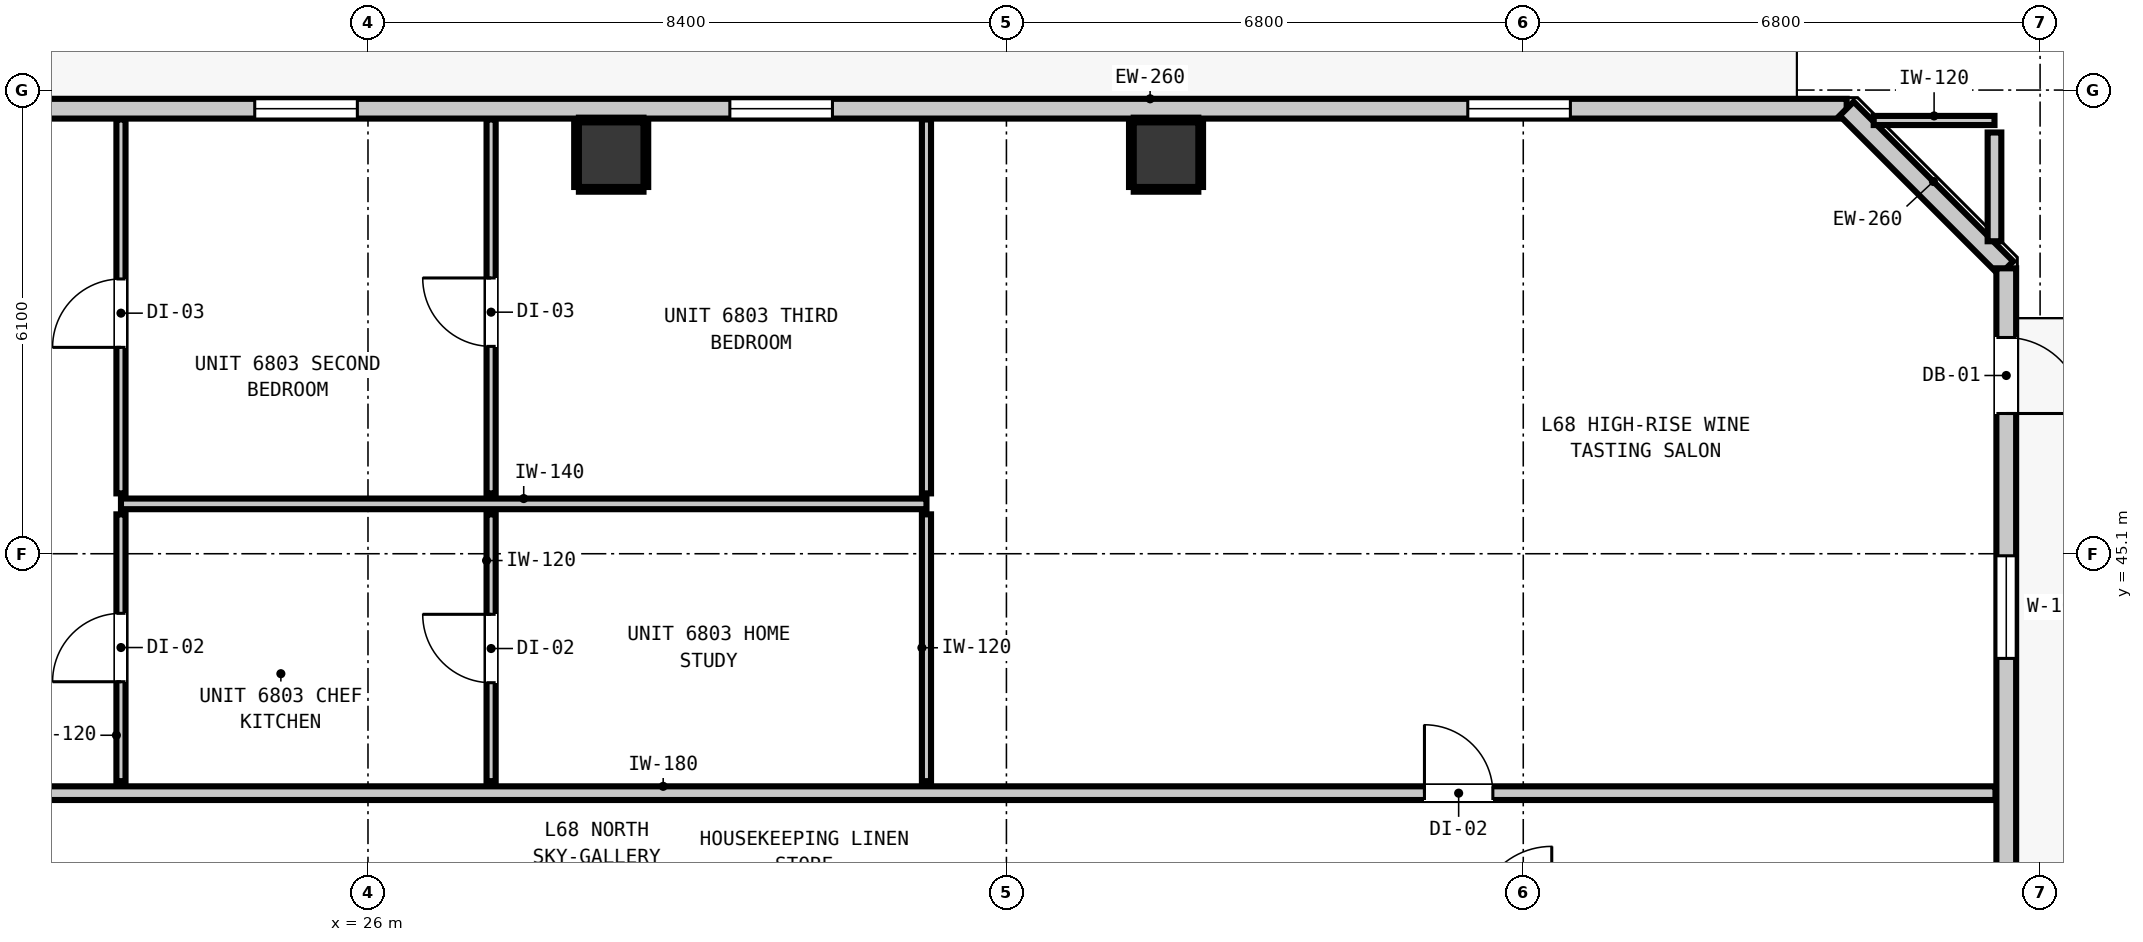
"""IFC4 building model, lengths in metres.
Left out: names, types, materials, properties, quantities, classifications, styles, units other than length and angle.
Written with IfcOpenShell. Run it as: python <this file> out.ifc"""

import sys

from ifc_helpers import new_model, si_unit, direction, frame, frame_2d, origin, origin_2d, place, context, subcontext, project, spatial, rectangle, extrude, element, fill, save


model = new_model("IFC4")
c1 = context("Model", 3, precision=1e-05, world=origin(), true_north=direction((0.0, 1.0)))
c2 = subcontext(c1, "Body", "Model", "MODEL_VIEW")
j1 = project(units=[si_unit("LENGTHUNIT", "METRE"), si_unit("PLANEANGLEUNIT", "RADIAN")], contexts=[c1])
p1 = place(None, origin())
s1 = spatial("IfcSite", under=j1, at=p1, CompositionType="ELEMENT")
p2 = place(p1, origin())
s2 = spatial("IfcBuilding", under=s1, at=p2, CompositionType="ELEMENT")
p3 = place(p2, frame((0.0, 0.0, 234.6)))
s3 = spatial("IfcBuildingStorey", under=s2, at=p3, CompositionType="ELEMENT", Elevation=234.6)
for number, where, z_axis, x_axis in (
    (1, (29.2, 50.35, 0.0), (0.0, 0.0, 1.0), (1.0, 0.0, 0.0)),
    (2, (36.5, 50.35, 0.0), (0.0, 0.0, 1.0), (1.0, 0.0, 0.0)),
):
    element("IfcColumn", number, at=place(p3, frame(where, z_axis=z_axis, x_axis=x_axis)), inside=s3, PredefinedType="COLUMN", context=c2, shape_type="SweptSolid", body=[
        extrude(rectangle(XDim=0.85, YDim=0.85, at=origin_2d()), origin(), (0.0, 0.0, 1.0), 3.32),
    ])
p4 = place(p3, frame((12.745, 50.955, 0.0), z_axis=(0.0, 0.0, 1.0), x_axis=(1.0, 0.0, 0.0)))
e3 = element("IfcWall", 3, at=p4, inside=s3, PredefinedType="STANDARD", context=c2, shape_type="SweptSolid", body=[
    extrude(rectangle(XDim=32.71, YDim=0.26, at=frame_2d((16.355, 0.0))), origin(), (0.0, 0.0, 1.0), 3.1),
])
p5 = place(p4, frame((1.61, 0.0, 0.0)))
e4 = element("IfcOpeningElement", 4, at=p5, cuts=e3, PredefinedType="OPENING", context=c2, shape_type="SweptSolid", body=[
    extrude(rectangle(XDim=1.0, YDim=2.15, at=frame_2d((0.5, 1.075))), frame((0.0, 0.14, 0.0), z_axis=(0.0, -1.0, 0.0), x_axis=(1.0, 0.0, 0.0)), (0.0, 0.0, 1.0), 0.28),
])
p6 = place(p4, frame((4.811, 0.0, 0.85)))
e5 = element("IfcOpeningElement", 5, at=p6, cuts=e3, PredefinedType="OPENING", context=c2, shape_type="SweptSolid", body=[
    extrude(rectangle(XDim=1.35, YDim=1.85, at=frame_2d((0.675, 0.925))), frame((0.0, 0.14, 0.0), z_axis=(0.0, -1.0, 0.0), x_axis=(1.0, 0.0, 0.0)), (0.0, 0.0, 1.0), 0.28),
])
p7 = place(p4, frame((11.765, 0.0, 0.85)))
e6 = element("IfcOpeningElement", 6, at=p7, cuts=e3, PredefinedType="OPENING", context=c2, shape_type="SweptSolid", body=[
    extrude(rectangle(XDim=1.35, YDim=1.85, at=frame_2d((0.675, 0.925))), frame((0.0, 0.14, 0.0), z_axis=(0.0, -1.0, 0.0), x_axis=(1.0, 0.0, 0.0)), (0.0, 0.0, 1.0), 0.28),
])
p8 = place(p4, frame((18.016, 0.0, 0.85)))
e7 = element("IfcOpeningElement", 7, at=p8, cuts=e3, PredefinedType="OPENING", context=c2, shape_type="SweptSolid", body=[
    extrude(rectangle(XDim=1.35, YDim=1.85, at=frame_2d((0.675, 0.925))), frame((0.0, 0.14, 0.0), z_axis=(0.0, -1.0, 0.0), x_axis=(1.0, 0.0, 0.0)), (0.0, 0.0, 1.0), 0.28),
])
p9 = place(p4, frame((27.725, 0.0, 0.85)))
e8 = element("IfcOpeningElement", 8, at=p9, cuts=e3, PredefinedType="OPENING", context=c2, shape_type="SweptSolid", body=[
    extrude(rectangle(XDim=1.35, YDim=1.85, at=frame_2d((0.675, 0.925))), frame((0.0, 0.14, 0.0), z_axis=(0.0, -1.0, 0.0), x_axis=(1.0, 0.0, 0.0)), (0.0, 0.0, 1.0), 0.28),
])
p10 = place(p3, frame((45.455, 50.955, 0.0), z_axis=(0.0, 0.0, 1.0), x_axis=(0.707065676302, -0.707147883682, 0.0)))
e9 = element("IfcWall", 9, at=p10, inside=s3, PredefinedType="STANDARD", context=c2, shape_type="SweptSolid", body=[
    extrude(rectangle(XDim=2.97, YDim=0.26, at=frame_2d((1.485, 0.0))), origin(), (0.0, 0.0, 1.0), 3.1),
])
p11 = place(p3, frame((47.555, 48.855, 0.0), z_axis=(0.0, 0.0, 1.0), x_axis=(0.0, -1.0, 0.0)))
e10 = element("IfcWall", 10, at=p11, inside=s3, PredefinedType="STANDARD", context=c2, shape_type="SweptSolid", body=[
    extrude(rectangle(XDim=30.31, YDim=0.26, at=frame_2d((15.155, 0.0))), origin(), (0.0, 0.0, 1.0), 3.1),
])
p12 = place(p11, frame((0.91, 0.0, 0.0)))
e11 = element("IfcOpeningElement", 11, at=p12, cuts=e10, PredefinedType="OPENING", context=c2, shape_type="SweptSolid", body=[
    extrude(rectangle(XDim=1.0, YDim=2.15, at=frame_2d((0.5, 1.075))), frame((0.0, 0.14, 0.0), z_axis=(0.0, -1.0, 0.0), x_axis=(1.0, 0.0, 0.0)), (0.0, 0.0, 1.0), 0.28),
])
p13 = place(p11, frame((3.782, 0.0, 0.85)))
e12 = element("IfcOpeningElement", 12, at=p13, cuts=e10, PredefinedType="OPENING", context=c2, shape_type="SweptSolid", body=[
    extrude(rectangle(XDim=1.35, YDim=1.85, at=frame_2d((0.675, 0.925))), frame((0.0, 0.14, 0.0), z_axis=(0.0, -1.0, 0.0), x_axis=(1.0, 0.0, 0.0)), (0.0, 0.0, 1.0), 0.28),
])
p14 = place(p3, frame((10.787, 41.95, 0.0), z_axis=(0.0, 0.0, 1.0), x_axis=(1.0, 0.0, 0.0)))
e13 = element("IfcWall", 13, at=p14, inside=s3, PredefinedType="PARTITIONING", context=c2, shape_type="SweptSolid", body=[
    extrude(rectangle(XDim=36.626, YDim=0.18, at=frame_2d((18.313, 0.0))), origin(), (0.0, 0.0, 1.0), 3.1),
])
p15 = place(p14, frame((8.081, 0.0, 0.0)))
e14 = element("IfcOpeningElement", 14, at=p15, cuts=e13, PredefinedType="OPENING", context=c2, shape_type="SweptSolid", body=[
    extrude(rectangle(XDim=1.0, YDim=2.15, at=frame_2d((0.5, 1.075))), frame((0.0, 0.1, 0.0), z_axis=(0.0, -1.0, 0.0), x_axis=(1.0, 0.0, 0.0)), (0.0, 0.0, 1.0), 0.2),
])
p16 = place(p14, frame((29.113, 0.0, 0.0)))
e15 = element("IfcOpeningElement", 15, at=p16, cuts=e13, PredefinedType="OPENING", context=c2, shape_type="SweptSolid", body=[
    extrude(rectangle(XDim=0.9, YDim=2.1, at=frame_2d((0.45, 1.05))), frame((0.0, 0.1, 0.0), z_axis=(0.0, -1.0, 0.0), x_axis=(1.0, 0.0, 0.0)), (0.0, 0.0, 1.0), 0.2),
])
p17 = place(p3, frame((22.75, 45.756, 0.0), z_axis=(0.0, 0.0, 1.0), x_axis=(1.0, 0.0, 0.0)))
e16 = element("IfcWall", 16, at=p17, inside=s3, PredefinedType="PARTITIONING", context=c2, shape_type="SweptSolid", body=[
    extrude(rectangle(XDim=10.598, YDim=0.14, at=frame_2d((5.299, 0.0))), origin(), (0.0, 0.0, 1.0), 3.1),
])
p18 = place(p3, frame((45.811, 50.8, 0.0), z_axis=(0.0, 0.0, 1.0), x_axis=(1.0, 0.0, 0.0)))
e17 = element("IfcWall", 17, at=p18, inside=s3, PredefinedType="PARTITIONING", context=c2, shape_type="SweptSolid", body=[
    extrude(rectangle(XDim=1.589, YDim=0.12, at=frame_2d((0.794, 0.0))), origin(), (0.0, 0.0, 1.0), 3.1),
])
p19 = place(p3, frame((47.4, 49.211, 0.0), z_axis=(0.0, 0.0, 1.0), x_axis=(0.0, 1.0, 0.0)))
e18 = element("IfcWall", 18, at=p19, inside=s3, PredefinedType="PARTITIONING", context=c2, shape_type="SweptSolid", body=[
    extrude(rectangle(XDim=1.431, YDim=0.18, at=frame_2d((0.716, 0.0))), origin(), (0.0, 0.0, 1.0), 3.1),
])
p20 = place(p3, frame((22.75, 42.108, 0.0), z_axis=(0.0, 0.0, 1.0), x_axis=(0.0, 1.0, 0.0)))
e19 = element("IfcWall", 19, at=p20, inside=s3, PredefinedType="PARTITIONING", context=c2, shape_type="SweptSolid", body=[
    extrude(rectangle(XDim=3.51, YDim=0.12, at=frame_2d((1.755, 0.0))), origin(), (0.0, 0.0, 1.0), 3.1),
])
p21 = place(p20, frame((1.308, 0.0, 0.0)))
e20 = element("IfcOpeningElement", 20, at=p21, cuts=e19, PredefinedType="OPENING", context=c2, shape_type="SweptSolid", body=[
    extrude(rectangle(XDim=0.9, YDim=2.1, at=frame_2d((0.45, 1.05))), frame((0.0, 0.07, 0.0), z_axis=(0.0, -1.0, 0.0), x_axis=(1.0, 0.0, 0.0)), (0.0, 0.0, 1.0), 0.14),
])
p22 = place(p3, frame((22.75, 45.894, 0.0), z_axis=(0.0, 0.0, 1.0), x_axis=(0.0, 1.0, 0.0)))
e21 = element("IfcWall", 21, at=p22, inside=s3, PredefinedType="PARTITIONING", context=c2, shape_type="SweptSolid", body=[
    extrude(rectangle(XDim=4.919, YDim=0.12, at=frame_2d((2.459, 0.0))), origin(), (0.0, 0.0, 1.0), 3.1),
])
p23 = place(p22, frame((1.921, 0.0, 0.0)))
e22 = element("IfcOpeningElement", 22, at=p23, cuts=e21, PredefinedType="OPENING", context=c2, shape_type="SweptSolid", body=[
    extrude(rectangle(XDim=0.9, YDim=2.1, at=frame_2d((0.45, 1.05))), frame((0.0, 0.07, 0.0), z_axis=(0.0, -1.0, 0.0), x_axis=(1.0, 0.0, 0.0)), (0.0, 0.0, 1.0), 0.14),
])
p24 = place(p3, frame((27.62, 42.108, 0.0), z_axis=(0.0, 0.0, 1.0), x_axis=(0.0, 1.0, 0.0)))
e23 = element("IfcWall", 23, at=p24, inside=s3, PredefinedType="PARTITIONING", context=c2, shape_type="SweptSolid", body=[
    extrude(rectangle(XDim=3.51, YDim=0.12, at=frame_2d((1.755, 0.0))), origin(), (0.0, 0.0, 1.0), 3.1),
])
p25 = place(p24, frame((1.295, 0.0, 0.0)))
e24 = element("IfcOpeningElement", 24, at=p25, cuts=e23, PredefinedType="OPENING", context=c2, shape_type="SweptSolid", body=[
    extrude(rectangle(XDim=0.9, YDim=2.1, at=frame_2d((0.45, 1.05))), frame((0.0, 0.07, 0.0), z_axis=(0.0, -1.0, 0.0), x_axis=(1.0, 0.0, 0.0)), (0.0, 0.0, 1.0), 0.14),
])
p26 = place(p3, frame((27.62, 45.894, 0.0), z_axis=(0.0, 0.0, 1.0), x_axis=(0.0, 1.0, 0.0)))
e25 = element("IfcWall", 25, at=p26, inside=s3, PredefinedType="PARTITIONING", context=c2, shape_type="SweptSolid", body=[
    extrude(rectangle(XDim=4.919, YDim=0.12, at=frame_2d((2.459, 0.0))), origin(), (0.0, 0.0, 1.0), 3.1),
])
p27 = place(p26, frame((1.934, 0.0, 0.0)))
e26 = element("IfcOpeningElement", 26, at=p27, cuts=e25, PredefinedType="OPENING", context=c2, shape_type="SweptSolid", body=[
    extrude(rectangle(XDim=0.9, YDim=2.1, at=frame_2d((0.45, 1.05))), frame((0.0, 0.07, 0.0), z_axis=(0.0, -1.0, 0.0), x_axis=(1.0, 0.0, 0.0)), (0.0, 0.0, 1.0), 0.14),
])
p28 = place(p3, frame((33.348, 42.108, 0.0), z_axis=(0.0, 0.0, 1.0), x_axis=(0.0, 1.0, 0.0)))
e27 = element("IfcWall", 27, at=p28, inside=s3, PredefinedType="PARTITIONING", context=c2, shape_type="SweptSolid", body=[
    extrude(rectangle(XDim=3.51, YDim=0.12, at=frame_2d((1.755, 0.0))), origin(), (0.0, 0.0, 1.0), 3.1),
])
p29 = place(p3, frame((33.348, 45.894, 0.0), z_axis=(0.0, 0.0, 1.0), x_axis=(0.0, 1.0, 0.0)))
e28 = element("IfcWall", 28, at=p29, inside=s3, PredefinedType="PARTITIONING", context=c2, shape_type="SweptSolid", body=[
    extrude(rectangle(XDim=4.919, YDim=0.12, at=frame_2d((2.459, 0.0))), origin(), (0.0, 0.0, 1.0), 3.1),
])
for number, where, z_axis, x_axis in (
    (29, (28.775, 49.893, 0.0), (0.0, 0.0, 1.0), (1.0, 0.0, 0.0)),
    (30, (28.775, 50.807, 0.0), (0.0, 0.0, 1.0), (1.0, 0.0, 0.0)),
):
    element("IfcWall", number, at=place(p3, frame(where, z_axis=z_axis, x_axis=x_axis)), inside=s3, PredefinedType="PARTITIONING", context=c2, shape_type="SweptSolid", body=[
        extrude(rectangle(XDim=0.85, YDim=0.06, at=frame_2d((0.425, 0.0))), origin(), (0.0, 0.0, 1.0), 1.45),
    ])
for number, where, z_axis, x_axis in (
    (31, (28.743, 49.925, 0.0), (0.0, 0.0, 1.0), (0.0, 1.0, 0.0)),
    (32, (29.657, 49.925, 0.0), (0.0, 0.0, 1.0), (0.0, 1.0, 0.0)),
):
    element("IfcWall", number, at=place(p3, frame(where, z_axis=z_axis, x_axis=x_axis)), inside=s3, PredefinedType="PARTITIONING", context=c2, shape_type="SweptSolid", body=[
        extrude(rectangle(XDim=0.85, YDim=0.06, at=frame_2d((0.425, 0.0))), origin(), (0.0, 0.0, 1.0), 1.45),
    ])
for number, where, z_axis, x_axis in (
    (33, (36.075, 49.893, 0.0), (0.0, 0.0, 1.0), (1.0, 0.0, 0.0)),
    (34, (36.075, 50.807, 0.0), (0.0, 0.0, 1.0), (1.0, 0.0, 0.0)),
):
    element("IfcWall", number, at=place(p3, frame(where, z_axis=z_axis, x_axis=x_axis)), inside=s3, PredefinedType="PARTITIONING", context=c2, shape_type="SweptSolid", body=[
        extrude(rectangle(XDim=0.85, YDim=0.06, at=frame_2d((0.425, 0.0))), origin(), (0.0, 0.0, 1.0), 1.45),
    ])
for number, where, z_axis, x_axis in (
    (35, (36.043, 49.925, 0.0), (0.0, 0.0, 1.0), (0.0, 1.0, 0.0)),
    (36, (36.957, 49.925, 0.0), (0.0, 0.0, 1.0), (0.0, 1.0, 0.0)),
):
    element("IfcWall", number, at=place(p3, frame(where, z_axis=z_axis, x_axis=x_axis)), inside=s3, PredefinedType="PARTITIONING", context=c2, shape_type="SweptSolid", body=[
        extrude(rectangle(XDim=0.85, YDim=0.06, at=frame_2d((0.425, 0.0))), origin(), (0.0, 0.0, 1.0), 1.45),
    ])
p30 = place(p12, origin())
e37 = element("IfcDoor", 37, at=p30, inside=s3, OperationType="SINGLE_SWING_RIGHT", PredefinedType="DOOR", context=c2, shape_type="SweptSolid", body=[
    extrude(rectangle(XDim=1.0, YDim=2.15, at=frame_2d((0.5, 1.075))), frame((0.0, 0.025, 0.0), z_axis=(0.0, -1.0, 0.0), x_axis=(1.0, 0.0, 0.0)), (0.0, 0.0, 1.0), 0.05),
])
fill(e11, e37)
p31 = place(p7, origin())
e38 = element("IfcWindow", 38, at=p31, inside=s3, PartitioningType="SINGLE_PANEL", PredefinedType="WINDOW", context=c2, shape_type="SweptSolid", body=[
    extrude(rectangle(XDim=1.35, YDim=1.85, at=frame_2d((0.675, 0.925))), frame((0.0, 0.03, 0.0), z_axis=(0.0, -1.0, 0.0), x_axis=(1.0, 0.0, 0.0)), (0.0, 0.0, 1.0), 0.06),
])
fill(e6, e38)
p32 = place(p8, origin())
e39 = element("IfcWindow", 39, at=p32, inside=s3, PartitioningType="SINGLE_PANEL", PredefinedType="WINDOW", context=c2, shape_type="SweptSolid", body=[
    extrude(rectangle(XDim=1.35, YDim=1.85, at=frame_2d((0.675, 0.925))), frame((0.0, 0.03, 0.0), z_axis=(0.0, -1.0, 0.0), x_axis=(1.0, 0.0, 0.0)), (0.0, 0.0, 1.0), 0.06),
])
fill(e7, e39)
p33 = place(p9, origin())
e40 = element("IfcWindow", 40, at=p33, inside=s3, PartitioningType="SINGLE_PANEL", PredefinedType="WINDOW", context=c2, shape_type="SweptSolid", body=[
    extrude(rectangle(XDim=1.35, YDim=1.85, at=frame_2d((0.675, 0.925))), frame((0.0, 0.03, 0.0), z_axis=(0.0, -1.0, 0.0), x_axis=(1.0, 0.0, 0.0)), (0.0, 0.0, 1.0), 0.06),
])
fill(e8, e40)
p34 = place(p13, origin())
e41 = element("IfcWindow", 41, at=p34, inside=s3, PartitioningType="SINGLE_PANEL", PredefinedType="WINDOW", context=c2, shape_type="SweptSolid", body=[
    extrude(rectangle(XDim=1.35, YDim=1.85, at=frame_2d((0.675, 0.925))), frame((0.0, 0.03, 0.0), z_axis=(0.0, -1.0, 0.0), x_axis=(1.0, 0.0, 0.0)), (0.0, 0.0, 1.0), 0.06),
])
fill(e12, e41)
p35 = place(p21, origin())
e42 = element("IfcDoor", 42, at=p35, inside=s3, OperationType="SINGLE_SWING_LEFT", PredefinedType="DOOR", context=c2, shape_type="SweptSolid", body=[
    extrude(rectangle(XDim=0.9, YDim=2.1, at=frame_2d((0.45, 1.05))), frame((0.0, 0.025, 0.0), z_axis=(0.0, -1.0, 0.0), x_axis=(1.0, 0.0, 0.0)), (0.0, 0.0, 1.0), 0.05),
])
fill(e20, e42)
p36 = place(p25, origin())
e43 = element("IfcDoor", 43, at=p36, inside=s3, OperationType="SINGLE_SWING_RIGHT", PredefinedType="DOOR", context=c2, shape_type="SweptSolid", body=[
    extrude(rectangle(XDim=0.9, YDim=2.1, at=frame_2d((0.45, 1.05))), frame((0.0, 0.025, 0.0), z_axis=(0.0, -1.0, 0.0), x_axis=(1.0, 0.0, 0.0)), (0.0, 0.0, 1.0), 0.05),
])
fill(e24, e43)
p37 = place(p23, origin())
e44 = element("IfcDoor", 44, at=p37, inside=s3, OperationType="SINGLE_SWING_LEFT", PredefinedType="DOOR", context=c2, shape_type="SweptSolid", body=[
    extrude(rectangle(XDim=0.9, YDim=2.1, at=frame_2d((0.45, 1.05))), frame((0.0, 0.025, 0.0), z_axis=(0.0, -1.0, 0.0), x_axis=(1.0, 0.0, 0.0)), (0.0, 0.0, 1.0), 0.05),
])
fill(e22, e44)
p38 = place(p27, origin())
e45 = element("IfcDoor", 45, at=p38, inside=s3, OperationType="SINGLE_SWING_RIGHT", PredefinedType="DOOR", context=c2, shape_type="SweptSolid", body=[
    extrude(rectangle(XDim=0.9, YDim=2.1, at=frame_2d((0.45, 1.05))), frame((0.0, 0.025, 0.0), z_axis=(0.0, -1.0, 0.0), x_axis=(1.0, 0.0, 0.0)), (0.0, 0.0, 1.0), 0.05),
])
fill(e26, e45)
p39 = place(p16, origin())
e46 = element("IfcDoor", 46, at=p39, inside=s3, OperationType="SINGLE_SWING_LEFT", PredefinedType="DOOR", context=c2, shape_type="SweptSolid", body=[
    extrude(rectangle(XDim=0.9, YDim=2.1, at=frame_2d((0.45, 1.05))), frame((0.0, 0.025, 0.0), z_axis=(0.0, -1.0, 0.0), x_axis=(1.0, 0.0, 0.0)), (0.0, 0.0, 1.0), 0.05),
])
fill(e15, e46)
save(model, sys.argv[1])
